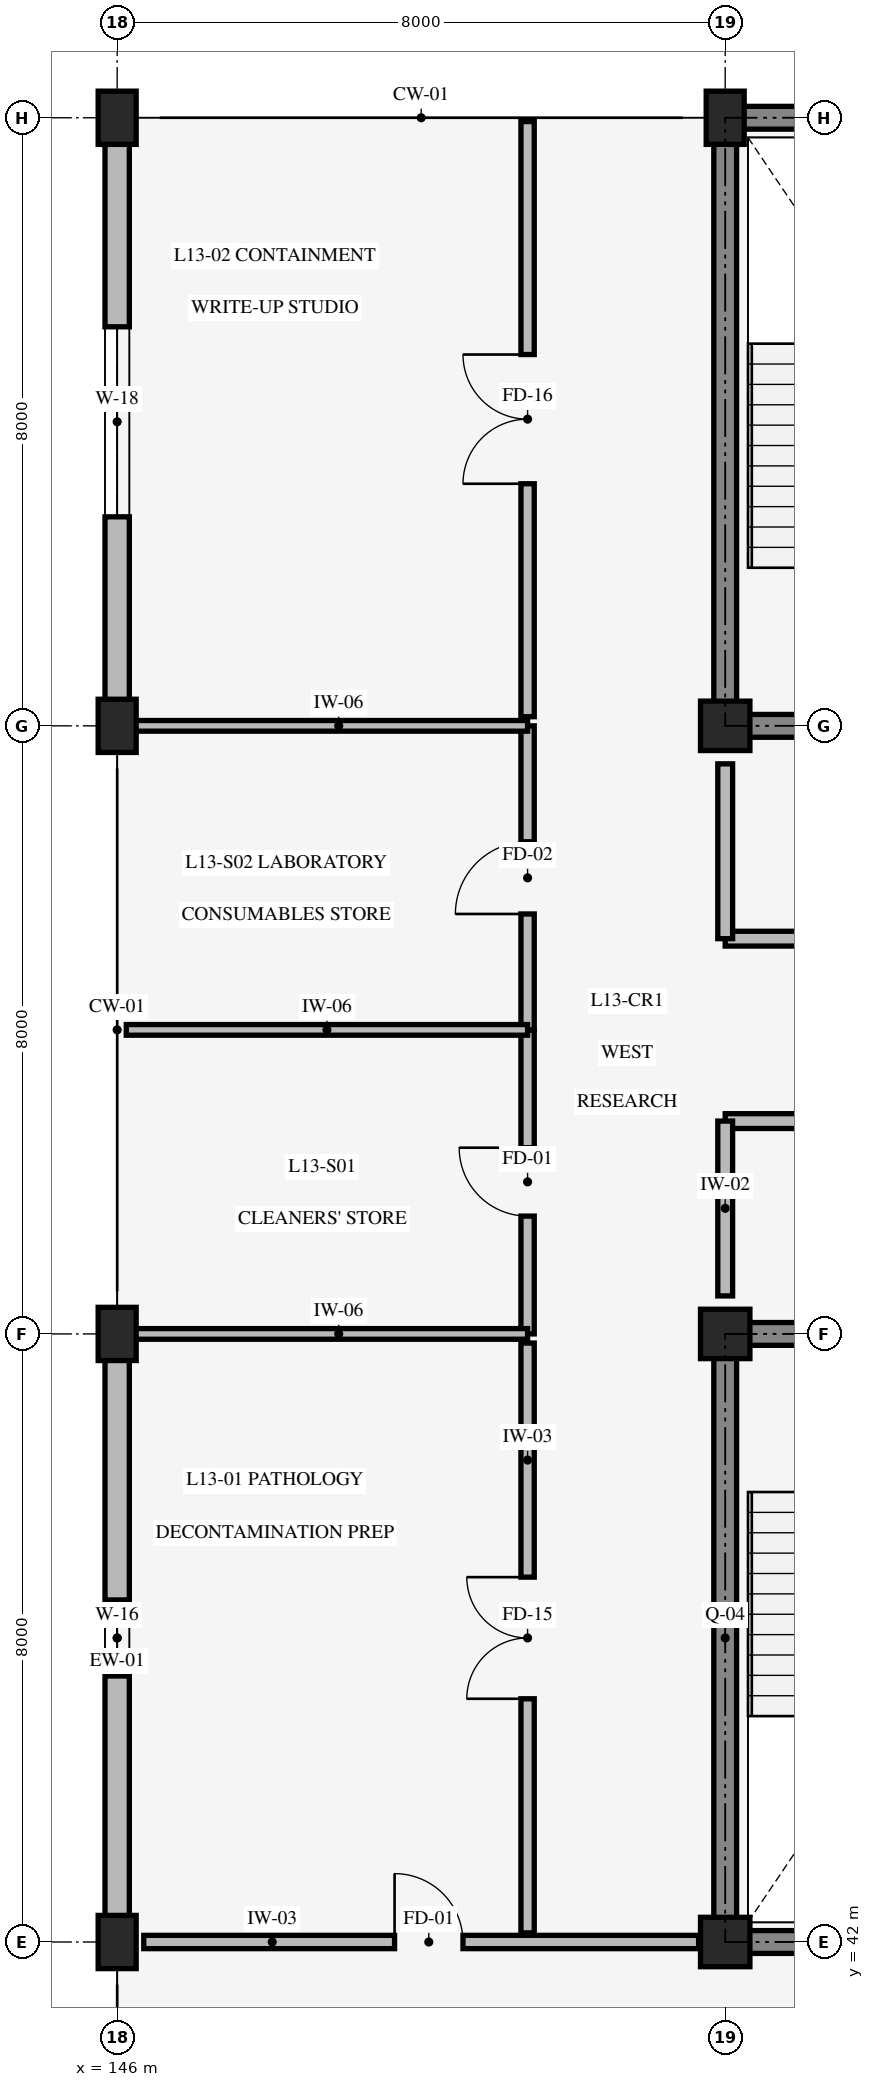
"""IFC4 building model, lengths in metres.
Left out: names, types, materials, properties, quantities, classifications, styles, units other than length and angle.
Written with IfcOpenShell. Run it as: python <this file> out.ifc"""

import sys

from ifc_helpers import new_model, si_unit, direction, frame, frame_2d, origin, origin_2d, place, context, subcontext, project, spatial, rectangle, extrude, element, fill, save


model = new_model("IFC4")
c1 = context("Model", 3, precision=1e-05, world=origin(), true_north=direction((0.0, 1.0)))
c2 = subcontext(c1, "Body", "Model", "MODEL_VIEW")
j1 = project(units=[si_unit("LENGTHUNIT", "METRE"), si_unit("PLANEANGLEUNIT", "RADIAN")], contexts=[c1])
p1 = place(None, origin())
s1 = spatial("IfcSite", under=j1, at=p1, CompositionType="ELEMENT")
p2 = place(p1, origin())
s2 = spatial("IfcBuilding", under=s1, at=p2, CompositionType="ELEMENT")
p3 = place(p2, frame((0.0, 0.0, 52.8)))
s3 = spatial("IfcBuildingStorey", under=s2, at=p3, CompositionType="ELEMENT", Elevation=52.8)
p4 = place(p3, frame((154.0, 42.0, 0.0), z_axis=(0.0, 0.0, 1.0), x_axis=(1.0, 0.0, 0.0)))
e1 = element("IfcWall", 1, at=p4, inside=s3, PredefinedType="SHEAR", context=c2, shape_type="SweptSolid", body=[
    extrude(rectangle(XDim=8.0, YDim=0.3, at=frame_2d((4.0, 0.0))), origin(), (0.0, 0.0, 1.0), 3.95),
])
p5 = place(p3, frame((162.0, 50.0, 0.0), z_axis=(0.0, 0.0, 1.0), x_axis=(-1.0, 0.0, 0.0)))
e2 = element("IfcWall", 2, at=p5, inside=s3, PredefinedType="SHEAR", context=c2, shape_type="SweptSolid", body=[
    extrude(rectangle(XDim=8.0, YDim=0.3, at=frame_2d((4.0, 0.0))), origin(), (0.0, 0.0, 1.0), 3.95),
])
p6 = place(p5, frame((5.3, 0.0, 0.0)))
e3 = element("IfcOpeningElement", 3, at=p6, cuts=e2, PredefinedType="OPENING", context=c2, shape_type="SweptSolid", body=[
    extrude(rectangle(XDim=1.3, YDim=2.15, at=frame_2d((0.65, 1.075))), frame((0.0, 0.16, 0.0), z_axis=(0.0, -1.0, 0.0), x_axis=(1.0, 0.0, 0.0)), (0.0, 0.0, 1.0), 0.32),
])
p7 = place(p5, frame((1.45, 0.0, 0.0)))
e4 = element("IfcOpeningElement", 4, at=p7, cuts=e2, PredefinedType="OPENING", context=c2, shape_type="SweptSolid", body=[
    extrude(rectangle(XDim=1.1, YDim=2.2, at=frame_2d((0.55, 1.1))), frame((0.0, 0.16, 0.0), z_axis=(0.0, -1.0, 0.0), x_axis=(1.0, 0.0, 0.0)), (0.0, 0.0, 1.0), 0.32),
])
p8 = place(p3, frame((154.0, 50.0, 0.0), z_axis=(0.0, 0.0, 1.0), x_axis=(0.0, -1.0, 0.0)))
e5 = element("IfcWall", 5, at=p8, inside=s3, PredefinedType="SHEAR", context=c2, shape_type="SweptSolid", body=[
    extrude(rectangle(XDim=8.0, YDim=0.3, at=frame_2d((4.0, 0.0))), origin(), (0.0, 0.0, 1.0), 3.95),
])
p9 = place(p3, frame((154.0, 58.0, 0.0), z_axis=(0.0, 0.0, 1.0), x_axis=(1.0, 0.0, 0.0)))
e6 = element("IfcWall", 6, at=p9, inside=s3, PredefinedType="SHEAR", context=c2, shape_type="SweptSolid", body=[
    extrude(rectangle(XDim=8.0, YDim=0.3, at=frame_2d((4.0, 0.0))), origin(), (0.0, 0.0, 1.0), 3.95),
])
p10 = place(p9, frame((1.4, 0.0, 0.0)))
e7 = element("IfcOpeningElement", 7, at=p10, cuts=e6, PredefinedType="OPENING", context=c2, shape_type="SweptSolid", body=[
    extrude(rectangle(XDim=1.3, YDim=2.15, at=frame_2d((0.65, 1.075))), frame((0.0, 0.16, 0.0), z_axis=(0.0, -1.0, 0.0), x_axis=(1.0, 0.0, 0.0)), (0.0, 0.0, 1.0), 0.32),
])
p11 = place(p9, frame((5.3, 0.0, 0.0)))
e8 = element("IfcOpeningElement", 8, at=p11, cuts=e6, PredefinedType="OPENING", context=c2, shape_type="SweptSolid", body=[
    extrude(rectangle(XDim=1.1, YDim=2.2, at=frame_2d((0.55, 1.1))), frame((0.0, 0.16, 0.0), z_axis=(0.0, -1.0, 0.0), x_axis=(1.0, 0.0, 0.0)), (0.0, 0.0, 1.0), 0.32),
])
for number, where, z_axis, x_axis in (
    (9, (162.0, 66.0, 0.0), (0.0, 0.0, 1.0), (-1.0, 0.0, 0.0)),
    (10, (154.0, 66.0, 0.0), (0.0, 0.0, 1.0), (0.0, -1.0, 0.0)),
):
    element("IfcWall", number, at=place(p3, frame(where, z_axis=z_axis, x_axis=x_axis)), inside=s3, PredefinedType="SHEAR", context=c2, shape_type="SweptSolid", body=[
        extrude(rectangle(XDim=8.0, YDim=0.3, at=frame_2d((4.0, 0.0))), origin(), (0.0, 0.0, 1.0), 3.95),
    ])
for number, where, z_axis, x_axis in (
    (11, (146.0, 42.0, 0.0), (0.0, 0.0, 1.0), (1.0, 0.0, 0.0)),
    (12, (146.0, 50.0, 0.0), (0.0, 0.0, 1.0), (1.0, 0.0, 0.0)),
    (13, (146.0, 58.0, 0.0), (0.0, 0.0, 1.0), (1.0, 0.0, 0.0)),
    (14, (146.0, 66.0, 0.0), (0.0, 0.0, 1.0), (1.0, 0.0, 0.0)),
):
    element("IfcColumn", number, at=place(p3, frame(where, z_axis=z_axis, x_axis=x_axis)), inside=s3, PredefinedType="COLUMN", context=c2, shape_type="SweptSolid", body=[
        extrude(rectangle(XDim=0.5, YDim=0.7, at=origin_2d()), origin(), (0.0, 0.0, 1.0), 4.2),
    ])
for number, where, z_axis, x_axis in (
    (15, (154.0, 42.0, 0.0), (0.0, 0.0, 1.0), (1.0, 0.0, 0.0)),
    (16, (154.0, 50.0, 0.0), (0.0, 0.0, 1.0), (1.0, 0.0, 0.0)),
    (17, (154.0, 58.0, 0.0), (0.0, 0.0, 1.0), (1.0, 0.0, 0.0)),
):
    element("IfcColumn", number, at=place(p3, frame(where, z_axis=z_axis, x_axis=x_axis)), inside=s3, PredefinedType="COLUMN", context=c2, shape_type="SweptSolid", body=[
        extrude(rectangle(XDim=0.65, YDim=0.65, at=origin_2d()), origin(), (0.0, 0.0, 1.0), 4.2),
    ])
p12 = place(p3, frame((154.0, 66.0, 0.0), z_axis=(0.0, 0.0, 1.0), x_axis=(1.0, 0.0, 0.0)))
e18 = element("IfcColumn", 18, at=p12, inside=s3, PredefinedType="COLUMN", context=c2, shape_type="SweptSolid", body=[
    extrude(rectangle(XDim=0.5, YDim=0.7, at=origin_2d()), origin(), (0.0, 0.0, 1.0), 4.2),
])
p13 = place(p3, frame((146.0, 42.0, 0.0), z_axis=(0.0, 0.0, 1.0), x_axis=(0.0, 1.0, 0.0)))
e19 = element("IfcWall", 19, at=p13, inside=s3, PredefinedType="STANDARD", context=c2, shape_type="SweptSolid", body=[
    extrude(rectangle(XDim=8.0, YDim=0.32, at=frame_2d((4.0, 0.0))), origin(), (0.0, 0.0, 1.0), 3.34),
])
p14 = place(p13, frame((3.5, 0.0, 0.85)))
e20 = element("IfcOpeningElement", 20, at=p14, cuts=e19, PredefinedType="OPENING", context=c2, shape_type="SweptSolid", body=[
    extrude(rectangle(XDim=1.0, YDim=1.5, at=frame_2d((0.5, 0.75))), frame((0.0, 0.17, 0.0), z_axis=(0.0, -1.0, 0.0), x_axis=(1.0, 0.0, 0.0)), (0.0, 0.0, 1.0), 0.34),
])
p15 = place(p3, frame((146.0, 58.0, 0.0), z_axis=(0.0, 0.0, 1.0), x_axis=(0.0, 1.0, 0.0)))
e21 = element("IfcWall", 21, at=p15, inside=s3, PredefinedType="STANDARD", context=c2, shape_type="SweptSolid", body=[
    extrude(rectangle(XDim=8.0, YDim=0.32, at=frame_2d((4.0, 0.0))), origin(), (0.0, 0.0, 1.0), 3.34),
])
p16 = place(p15, frame((2.75, 0.0, 0.85)))
e22 = element("IfcOpeningElement", 22, at=p16, cuts=e21, PredefinedType="OPENING", context=c2, shape_type="SweptSolid", body=[
    extrude(rectangle(XDim=2.5, YDim=1.8, at=frame_2d((1.25, 0.9))), frame((0.0, 0.17, 0.0), z_axis=(0.0, -1.0, 0.0), x_axis=(1.0, 0.0, 0.0)), (0.0, 0.0, 1.0), 0.34),
])
p17 = place(p3, frame((154.0, 52.8, 0.0), z_axis=(0.0, 0.0, 1.0), x_axis=(1.0, 0.0, 0.0)))
e23 = element("IfcWall", 23, at=p17, inside=s3, PredefinedType="STANDARD", context=c2, shape_type="SweptSolid", body=[
    extrude(rectangle(XDim=7.6, YDim=0.195, at=frame_2d((3.8, 0.0))), origin(), (0.0, 0.0, 1.0), 3.9),
])
p18 = place(p17, frame((2.8, 0.0, 0.0)))
e24 = element("IfcOpeningElement", 24, at=p18, cuts=e23, PredefinedType="OPENING", context=c2, shape_type="SweptSolid", body=[
    extrude(rectangle(XDim=1.25, YDim=2.15, at=frame_2d((0.625, 1.075))), frame((0.0, 0.107, 0.0), z_axis=(0.0, -1.0, 0.0), x_axis=(1.0, 0.0, 0.0)), (0.0, 0.0, 1.0), 0.215),
])
p19 = place(p3, frame((154.0, 50.5, 0.0), z_axis=(0.0, 0.0, 1.0), x_axis=(0.0, 1.0, 0.0)))
e25 = element("IfcWall", 25, at=p19, inside=s3, PredefinedType="STANDARD", context=c2, shape_type="SweptSolid", body=[
    extrude(rectangle(XDim=2.3, YDim=0.195, at=frame_2d((1.15, 0.0))), origin(), (0.0, 0.0, 1.0), 3.34),
])
p20 = place(p3, frame((154.0, 55.2, 0.0), z_axis=(0.0, 0.0, 1.0), x_axis=(1.0, 0.0, 0.0)))
e26 = element("IfcWall", 26, at=p20, inside=s3, PredefinedType="STANDARD", context=c2, shape_type="SweptSolid", body=[
    extrude(rectangle(XDim=7.6, YDim=0.195, at=frame_2d((3.8, 0.0))), origin(), (0.0, 0.0, 1.0), 3.9),
])
p21 = place(p20, frame((2.8, 0.0, 0.0)))
e27 = element("IfcOpeningElement", 27, at=p21, cuts=e26, PredefinedType="OPENING", context=c2, shape_type="SweptSolid", body=[
    extrude(rectangle(XDim=1.35, YDim=2.15, at=frame_2d((0.675, 1.075))), frame((0.0, 0.107, 0.0), z_axis=(0.0, -1.0, 0.0), x_axis=(1.0, 0.0, 0.0)), (0.0, 0.0, 1.0), 0.215),
])
p22 = place(p3, frame((154.0, 55.2, 0.0), z_axis=(0.0, 0.0, 1.0), x_axis=(0.0, 1.0, 0.0)))
e28 = element("IfcWall", 28, at=p22, inside=s3, PredefinedType="STANDARD", context=c2, shape_type="SweptSolid", body=[
    extrude(rectangle(XDim=2.3, YDim=0.195, at=frame_2d((1.15, 0.0))), origin(), (0.0, 0.0, 1.0), 3.34),
])
p23 = place(p3, frame((151.4, 42.12, 0.0), z_axis=(0.0, 0.0, 1.0), x_axis=(0.0, 1.0, 0.0)))
e29 = element("IfcWall", 29, at=p23, inside=s3, PredefinedType="STANDARD", context=c2, shape_type="SweptSolid", body=[
    extrude(rectangle(XDim=7.76, YDim=0.175, at=frame_2d((3.88, 0.0))), origin(), (0.0, 0.0, 1.0), 3.9),
])
p24 = place(p23, frame((3.08, 0.0, 0.0)))
e30 = element("IfcOpeningElement", 30, at=p24, cuts=e29, PredefinedType="OPENING", context=c2, shape_type="SweptSolid", body=[
    extrude(rectangle(XDim=1.6, YDim=2.25, at=frame_2d((0.8, 1.125))), frame((0.0, 0.098, 0.0), z_axis=(0.0, -1.0, 0.0), x_axis=(1.0, 0.0, 0.0)), (0.0, 0.0, 1.0), 0.195),
])
p25 = place(p3, frame((151.4, 58.12, 0.0), z_axis=(0.0, 0.0, 1.0), x_axis=(0.0, 1.0, 0.0)))
e31 = element("IfcWall", 31, at=p25, inside=s3, PredefinedType="STANDARD", context=c2, shape_type="SweptSolid", body=[
    extrude(rectangle(XDim=7.83, YDim=0.175, at=frame_2d((3.915, 0.0))), origin(), (0.0, 0.0, 1.0), 3.9),
])
p26 = place(p25, frame((3.065, 0.0, 0.0)))
e32 = element("IfcOpeningElement", 32, at=p26, cuts=e31, PredefinedType="OPENING", context=c2, shape_type="SweptSolid", body=[
    extrude(rectangle(XDim=1.7, YDim=2.3, at=frame_2d((0.85, 1.15))), frame((0.0, 0.098, 0.0), z_axis=(0.0, -1.0, 0.0), x_axis=(1.0, 0.0, 0.0)), (0.0, 0.0, 1.0), 0.195),
])
p27 = place(p3, frame((151.4, 50.0, 0.0), z_axis=(0.0, 0.0, 1.0), x_axis=(0.0, 1.0, 0.0)))
e33 = element("IfcWall", 33, at=p27, inside=s3, PredefinedType="STANDARD", context=c2, shape_type="SweptSolid", body=[
    extrude(rectangle(XDim=4.0, YDim=0.175, at=frame_2d((2.0, 0.0))), origin(), (0.0, 0.0, 1.0), 3.9),
])
p28 = place(p27, frame((1.55, 0.0, 0.0)))
e34 = element("IfcOpeningElement", 34, at=p28, cuts=e33, PredefinedType="OPENING", context=c2, shape_type="SweptSolid", body=[
    extrude(rectangle(XDim=0.9, YDim=2.1, at=frame_2d((0.45, 1.05))), frame((0.0, 0.098, 0.0), z_axis=(0.0, -1.0, 0.0), x_axis=(1.0, 0.0, 0.0)), (0.0, 0.0, 1.0), 0.195),
])
p29 = place(p3, frame((151.4, 54.0, 0.0), z_axis=(0.0, 0.0, 1.0), x_axis=(0.0, 1.0, 0.0)))
e35 = element("IfcWall", 35, at=p29, inside=s3, PredefinedType="STANDARD", context=c2, shape_type="SweptSolid", body=[
    extrude(rectangle(XDim=4.0, YDim=0.175, at=frame_2d((2.0, 0.0))), origin(), (0.0, 0.0, 1.0), 3.9),
])
p30 = place(p29, frame((1.525, 0.0, 0.0)))
e36 = element("IfcOpeningElement", 36, at=p30, cuts=e35, PredefinedType="OPENING", context=c2, shape_type="SweptSolid", body=[
    extrude(rectangle(XDim=0.95, YDim=2.1, at=frame_2d((0.475, 1.05))), frame((0.0, 0.098, 0.0), z_axis=(0.0, -1.0, 0.0), x_axis=(1.0, 0.0, 0.0)), (0.0, 0.0, 1.0), 0.195),
])
p31 = place(p3, frame((146.12, 50.0, 0.0), z_axis=(0.0, 0.0, 1.0), x_axis=(1.0, 0.0, 0.0)))
e37 = element("IfcWall", 37, at=p31, inside=s3, PredefinedType="STANDARD", context=c2, shape_type="SweptSolid", body=[
    extrude(rectangle(XDim=5.28, YDim=0.14, at=frame_2d((2.64, 0.0))), origin(), (0.0, 0.0, 1.0), 3.29),
])
p32 = place(p3, frame((146.12, 54.0, 0.0), z_axis=(0.0, 0.0, 1.0), x_axis=(1.0, 0.0, 0.0)))
e38 = element("IfcWall", 38, at=p32, inside=s3, PredefinedType="STANDARD", context=c2, shape_type="SweptSolid", body=[
    extrude(rectangle(XDim=5.28, YDim=0.14, at=frame_2d((2.64, 0.0))), origin(), (0.0, 0.0, 1.0), 3.9),
])
p33 = place(p3, frame((146.12, 58.0, 0.0), z_axis=(0.0, 0.0, 1.0), x_axis=(1.0, 0.0, 0.0)))
e39 = element("IfcWall", 39, at=p33, inside=s3, PredefinedType="STANDARD", context=c2, shape_type="SweptSolid", body=[
    extrude(rectangle(XDim=5.28, YDim=0.14, at=frame_2d((2.64, 0.0))), origin(), (0.0, 0.0, 1.0), 3.29),
])
p34 = place(p3, frame((146.35, 42.0, 0.0), z_axis=(0.0, 0.0, 1.0), x_axis=(1.0, 0.0, 0.0)))
e40 = element("IfcWall", 40, at=p34, inside=s3, PredefinedType="STANDARD", context=c2, shape_type="SweptSolid", body=[
    extrude(rectangle(XDim=7.3, YDim=0.175, at=frame_2d((3.65, 0.0))), origin(), (0.0, 0.0, 1.0), 3.19),
])
p35 = place(p34, frame((3.3, 0.0, 0.0)))
e41 = element("IfcOpeningElement", 41, at=p35, cuts=e40, PredefinedType="OPENING", context=c2, shape_type="SweptSolid", body=[
    extrude(rectangle(XDim=0.9, YDim=2.1, at=frame_2d((0.45, 1.05))), frame((0.0, 0.098, 0.0), z_axis=(0.0, -1.0, 0.0), x_axis=(1.0, 0.0, 0.0)), (0.0, 0.0, 1.0), 0.195),
])
p36 = place(p14, origin())
e42 = element("IfcWindow", 42, at=p36, inside=s3, PartitioningType="SINGLE_PANEL", PredefinedType="WINDOW", context=c2, shape_type="SweptSolid", body=[
    extrude(rectangle(XDim=1.0, YDim=1.5, at=frame_2d((0.5, 0.75))), frame((0.0, 0.03, 0.0), z_axis=(0.0, -1.0, 0.0), x_axis=(1.0, 0.0, 0.0)), (0.0, 0.0, 1.0), 0.06),
])
fill(e20, e42)
p37 = place(p16, origin())
e43 = element("IfcWindow", 43, at=p37, inside=s3, PartitioningType="SINGLE_PANEL", PredefinedType="WINDOW", context=c2, shape_type="SweptSolid", body=[
    extrude(rectangle(XDim=2.5, YDim=1.8, at=frame_2d((1.25, 0.9))), frame((0.0, 0.03, 0.0), z_axis=(0.0, -1.0, 0.0), x_axis=(1.0, 0.0, 0.0)), (0.0, 0.0, 1.0), 0.06),
])
fill(e22, e43)
p38 = place(p24, origin())
e44 = element("IfcDoor", 44, at=p38, inside=s3, OperationType="DOUBLE_DOOR_SINGLE_SWING", PredefinedType="DOOR", context=c2, shape_type="SweptSolid", body=[
    extrude(rectangle(XDim=1.6, YDim=2.25, at=frame_2d((0.8, 1.125))), frame((0.0, 0.025, 0.0), z_axis=(0.0, -1.0, 0.0), x_axis=(1.0, 0.0, 0.0)), (0.0, 0.0, 1.0), 0.05),
])
fill(e30, e44)
p39 = place(p26, origin())
e45 = element("IfcDoor", 45, at=p39, inside=s3, OperationType="DOUBLE_DOOR_SINGLE_SWING", PredefinedType="DOOR", context=c2, shape_type="SweptSolid", body=[
    extrude(rectangle(XDim=1.7, YDim=2.3, at=frame_2d((0.85, 1.15))), frame((0.0, 0.025, 0.0), z_axis=(0.0, -1.0, 0.0), x_axis=(1.0, 0.0, 0.0)), (0.0, 0.0, 1.0), 0.05),
])
fill(e32, e45)
p40 = place(p28, origin())
e46 = element("IfcDoor", 46, at=p40, inside=s3, OperationType="SINGLE_SWING_RIGHT", PredefinedType="DOOR", context=c2, shape_type="SweptSolid", body=[
    extrude(rectangle(XDim=0.9, YDim=2.1, at=frame_2d((0.45, 1.05))), frame((0.0, 0.025, 0.0), z_axis=(0.0, -1.0, 0.0), x_axis=(1.0, 0.0, 0.0)), (0.0, 0.0, 1.0), 0.05),
])
fill(e34, e46)
p41 = place(p30, origin())
e47 = element("IfcDoor", 47, at=p41, inside=s3, OperationType="SINGLE_SWING_LEFT", PredefinedType="DOOR", context=c2, shape_type="SweptSolid", body=[
    extrude(rectangle(XDim=0.95, YDim=2.1, at=frame_2d((0.475, 1.05))), frame((0.0, 0.025, 0.0), z_axis=(0.0, -1.0, 0.0), x_axis=(1.0, 0.0, 0.0)), (0.0, 0.0, 1.0), 0.05),
])
fill(e36, e47)
p42 = place(p35, origin())
e48 = element("IfcDoor", 48, at=p42, inside=s3, OperationType="SINGLE_SWING_LEFT", PredefinedType="DOOR", context=c2, shape_type="SweptSolid", body=[
    extrude(rectangle(XDim=0.9, YDim=2.1, at=frame_2d((0.45, 1.05))), frame((0.0, 0.025, 0.0), z_axis=(0.0, -1.0, 0.0), x_axis=(1.0, 0.0, 0.0)), (0.0, 0.0, 1.0), 0.05),
])
fill(e41, e48)
save(model, sys.argv[1])
